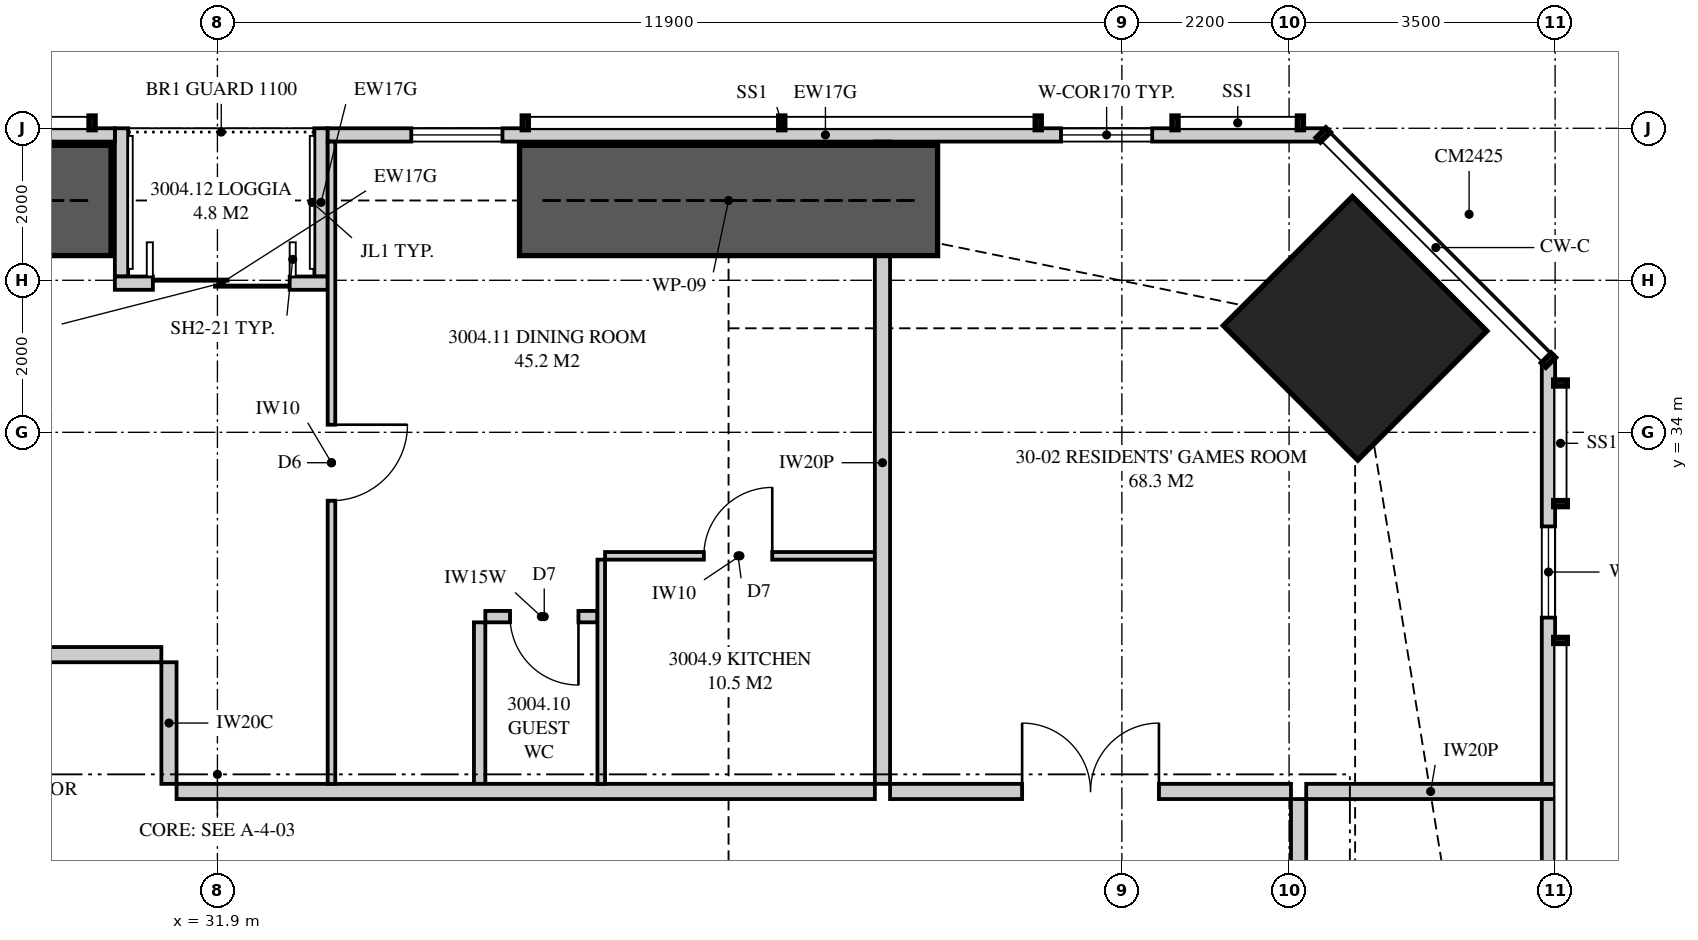
"""IFC4 building model, lengths in metres.
Left out: names, types, materials, properties, quantities, classifications, styles, units other than length and angle.
Written with IfcOpenShell. Run it as: python <this file> out.ifc"""

import sys

from ifc_helpers import new_model, si_unit, direction, frame, frame_2d, origin, origin_2d, place, context, subcontext, project, spatial, polyline, rectangle, outline, extrude, element, fill, save


model = new_model("IFC4")
c1 = context("Model", 3, precision=1e-05, world=origin(), true_north=direction((0.0, 1.0)))
c2 = subcontext(c1, "Body", "Model", "MODEL_VIEW")
j1 = project(units=[si_unit("LENGTHUNIT", "METRE"), si_unit("PLANEANGLEUNIT", "RADIAN")], contexts=[c1])
p1 = place(None, origin())
s1 = spatial("IfcSite", under=j1, at=p1, CompositionType="ELEMENT")
p2 = place(p1, origin())
s2 = spatial("IfcBuilding", under=s1, at=p2, CompositionType="ELEMENT")
p3 = place(p2, frame((0.0, 0.0, 111.55)))
s3 = spatial("IfcBuildingStorey", under=s2, at=p3, CompositionType="ELEMENT", Elevation=111.55)
p4 = place(p3, frame((46.869, 35.369, 0.0), z_axis=(0.0, 0.0, 1.0), x_axis=(-0.707106781187, -0.707106781187, 0.0)))
e1 = element("IfcColumn", 1, at=p4, inside=s3, PredefinedType="COLUMN", context=c2, shape_type="SweptSolid", body=[
    extrude(rectangle(XDim=2.4, YDim=2.5, at=origin_2d()), origin(), (0.0, 0.0, 1.0), 3.35),
])
p5 = place(p3, frame((49.413, 3.051, 0.0), z_axis=(0.0, 0.0, 1.0), x_axis=(0.0, 1.0, 0.0)))
e2 = element("IfcWall", 2, at=p5, inside=s3, PredefinedType="SOLIDWALL", context=c2, shape_type="SweptSolid", body=[
    extrude(outline(polyline([(0.0, 0.0), (31.897, 0.0), (31.897, 3.11), (22.167, 3.11), (22.167, 2.15), (22.074, 2.15), (22.074, 3.11), (21.949, 3.11), (21.949, 2.15), (9.949, 2.15), (9.949, 3.11), (9.823, 3.11), (9.823, 2.15), (9.73, 2.15), (9.73, 3.11), (0.0, 3.11), (0.0, 0.0)])), frame((0.0, 0.087, 0.0), z_axis=(0.0, -1.0, 0.0), x_axis=(1.0, 0.0, 0.0)), (0.0, 0.0, 1.0), 0.175),
])
p6 = place(p5, frame((2.118, 0.0, 0.4)))
e3 = element("IfcOpeningElement", 3, at=p6, cuts=e2, PredefinedType="OPENING", context=c2, shape_type="SweptSolid", body=[
    extrude(rectangle(XDim=1.8, YDim=1.7, at=frame_2d((0.9, 0.85))), frame((0.0, 0.097, 0.0), z_axis=(0.0, -1.0, 0.0), x_axis=(1.0, 0.0, 0.0)), (0.0, 0.0, 1.0), 0.195),
])
p7 = place(p5, frame((14.849, 0.0, 0.4)))
e4 = element("IfcOpeningElement", 4, at=p7, cuts=e2, PredefinedType="OPENING", context=c2, shape_type="SweptSolid", body=[
    extrude(rectangle(XDim=1.2, YDim=1.7, at=frame_2d((0.6, 0.85))), frame((0.0, 0.097, 0.0), z_axis=(0.0, -1.0, 0.0), x_axis=(1.0, 0.0, 0.0)), (0.0, 0.0, 1.0), 0.195),
])
p8 = place(p5, frame((28.51, 0.0, 0.4)))
e5 = element("IfcOpeningElement", 5, at=p8, cuts=e2, PredefinedType="OPENING", context=c2, shape_type="SweptSolid", body=[
    extrude(rectangle(XDim=1.2, YDim=1.7, at=frame_2d((0.6, 0.85))), frame((0.0, 0.097, 0.0), z_axis=(0.0, -1.0, 0.0), x_axis=(1.0, 0.0, 0.0)), (0.0, 0.0, 1.0), 0.195),
])
p9 = place(p3, frame((46.449, 37.913, 0.0), z_axis=(0.0, 0.0, 1.0), x_axis=(-1.0, 0.0, 0.0)))
e6 = element("IfcWall", 6, at=p9, inside=s3, PredefinedType="SOLIDWALL", context=c2, shape_type="SweptSolid", body=[
    extrude(outline(polyline([(0.0, 0.0), (13.098, 0.0), (13.098, 2.15), (7.824, 2.15), (7.824, 3.11), (7.666, 3.11), (7.666, 2.15), (7.62, 2.15), (7.62, 3.11), (0.0, 3.11), (0.0, 0.0)])), frame((0.0, 0.087, 0.0), z_axis=(0.0, -1.0, 0.0), x_axis=(1.0, 0.0, 0.0)), (0.0, 0.0, 1.0), 0.175),
])
p10 = place(p9, frame((2.25, 0.0, 0.4)))
e7 = element("IfcOpeningElement", 7, at=p10, cuts=e6, PredefinedType="OPENING", context=c2, shape_type="SweptSolid", body=[
    extrude(rectangle(XDim=1.2, YDim=1.7, at=frame_2d((0.6, 0.85))), frame((0.0, 0.097, 0.0), z_axis=(0.0, -1.0, 0.0), x_axis=(1.0, 0.0, 0.0)), (0.0, 0.0, 1.0), 0.195),
])
p11 = place(p9, frame((10.798, 0.0, 0.4)))
e8 = element("IfcOpeningElement", 8, at=p11, cuts=e6, PredefinedType="OPENING", context=c2, shape_type="SweptSolid", body=[
    extrude(rectangle(XDim=1.2, YDim=1.7, at=frame_2d((0.6, 0.85))), frame((0.0, 0.097, 0.0), z_axis=(0.0, -1.0, 0.0), x_axis=(1.0, 0.0, 0.0)), (0.0, 0.0, 1.0), 0.195),
])
p12 = place(p3, frame((30.551, 37.913, 0.0), z_axis=(0.0, 0.0, 1.0), x_axis=(-1.0, 0.0, 0.0)))
e9 = element("IfcWall", 9, at=p12, inside=s3, PredefinedType="SOLIDWALL", context=c2, shape_type="SweptSolid", body=[
    extrude(outline(polyline([(0.0, 0.0), (21.499, 0.0), (21.499, 3.11), (13.879, 3.11), (13.879, 2.15), (13.834, 2.15), (13.834, 3.11), (13.676, 3.11), (13.676, 2.15), (0.0, 2.15), (0.0, 0.0)])), frame((0.0, 0.087, 0.0), z_axis=(0.0, -1.0, 0.0), x_axis=(1.0, 0.0, 0.0)), (0.0, 0.0, 1.0), 0.175),
])
p13 = place(p12, frame((5.826, 0.0, 0.4)))
e10 = element("IfcOpeningElement", 10, at=p13, cuts=e9, PredefinedType="OPENING", context=c2, shape_type="SweptSolid", body=[
    extrude(rectangle(XDim=1.8, YDim=1.7, at=frame_2d((0.9, 0.85))), frame((0.0, 0.097, 0.0), z_axis=(0.0, -1.0, 0.0), x_axis=(1.0, 0.0, 0.0)), (0.0, 0.0, 1.0), 0.195),
])
p14 = place(p12, frame((8.993, 0.0, 0.4)))
e11 = element("IfcOpeningElement", 11, at=p14, cuts=e9, PredefinedType="OPENING", context=c2, shape_type="SweptSolid", body=[
    extrude(rectangle(XDim=1.8, YDim=1.7, at=frame_2d((0.9, 0.85))), frame((0.0, 0.097, 0.0), z_axis=(0.0, -1.0, 0.0), x_axis=(1.0, 0.0, 0.0)), (0.0, 0.0, 1.0), 0.195),
])
p15 = place(p12, frame((16.566, 0.0, 0.4)))
e12 = element("IfcOpeningElement", 12, at=p15, cuts=e9, PredefinedType="OPENING", context=c2, shape_type="SweptSolid", body=[
    extrude(rectangle(XDim=1.8, YDim=1.7, at=frame_2d((0.9, 0.85))), frame((0.0, 0.097, 0.0), z_axis=(0.0, -1.0, 0.0), x_axis=(1.0, 0.0, 0.0)), (0.0, 0.0, 1.0), 0.195),
])
p16 = place(p3, frame((33.351, 35.962, 0.0), z_axis=(0.0, 0.0, 1.0), x_axis=(-1.0, 0.0, 0.0)))
e13 = element("IfcWall", 13, at=p16, inside=s3, PredefinedType="SOLIDWALL", context=c2, shape_type="SweptSolid", body=[
    extrude(rectangle(XDim=2.8, YDim=0.175, at=frame_2d((1.4, 0.0))), origin(), (0.0, 0.0, 1.0), 3.11),
])
p17 = place(p16, frame((0.5, 0.0, 0.0)))
e14 = element("IfcOpeningElement", 14, at=p17, cuts=e13, PredefinedType="OPENING", context=c2, shape_type="SweptSolid", body=[
    extrude(rectangle(XDim=1.8, YDim=2.1, at=frame_2d((0.9, 1.05))), frame((0.0, 0.097, 0.0), z_axis=(0.0, -1.0, 0.0), x_axis=(1.0, 0.0, 0.0)), (0.0, 0.0, 1.0), 0.195),
])
for number, where, z_axis, x_axis in (
    (15, (33.263, 38.0, 0.0), (0.0, 0.0, 1.0), (0.0, -1.0, 0.0)),
    (16, (30.638, 38.0, 0.0), (0.0, 0.0, 1.0), (0.0, -1.0, 0.0)),
):
    element("IfcWall", number, at=place(p3, frame(where, z_axis=z_axis, x_axis=x_axis)), inside=s3, PredefinedType="SOLIDWALL", context=c2, shape_type="SweptSolid", body=[
        extrude(outline(polyline([(0.0, 0.0), (1.95, 0.0), (1.95, 3.11), (1.75, 3.11), (1.75, 2.15), (0.15, 2.15), (0.15, 3.11), (0.0, 3.11), (0.0, 0.0)])), frame((0.0, 0.087, 0.0), z_axis=(0.0, -1.0, 0.0), x_axis=(1.0, 0.0, 0.0)), (0.0, 0.0, 1.0), 0.175),
    ])
p18 = place(p3, frame((40.65, 37.825, 0.0), z_axis=(0.0, 0.0, 1.0), x_axis=(0.0, -1.0, 0.0)))
e17 = element("IfcWall", 17, at=p18, inside=s3, PredefinedType="PARTITIONING", context=c2, shape_type="SweptSolid", body=[
    extrude(outline(polyline([(0.259, 3.11), (0.0, 3.11), (0.0, 0.0), (0.529, 0.0), (0.529, 0.12), (1.021, 0.12), (1.021, 0.0), (8.45, 0.0), (8.45, 3.11), (3.766, 3.11), (3.766, 2.51), (2.117, 2.51), (2.117, 2.15), (1.021, 2.15), (1.021, 2.03), (0.529, 2.03), (0.529, 2.15), (0.259, 2.15), (0.259, 3.11)])), frame((0.0, 0.1, 0.0), z_axis=(0.0, -1.0, 0.0), x_axis=(1.0, 0.0, 0.0)), (0.0, 0.0, 1.0), 0.2),
])
p19 = place(p3, frame((37.0, 32.375, 0.0), z_axis=(0.0, 0.0, 1.0), x_axis=(1.0, 0.0, 0.0)))
e18 = element("IfcWall", 18, at=p19, inside=s3, PredefinedType="PARTITIONING", context=c2, shape_type="SweptSolid", body=[
    extrude(outline(polyline([(0.0, 0.0), (3.55, 0.0), (3.55, 3.11), (1.912, 3.11), (1.912, 2.541), (1.338, 2.541), (1.338, 3.11), (0.0, 3.11), (0.0, 0.0)])), frame((0.0, 0.05, 0.0), z_axis=(0.0, -1.0, 0.0), x_axis=(1.0, 0.0, 0.0)), (0.0, 0.0, 1.0), 0.1),
])
p20 = place(p19, frame((1.3, 0.0, 0.0)))
e19 = element("IfcOpeningElement", 19, at=p20, cuts=e18, PredefinedType="OPENING", context=c2, shape_type="SweptSolid", body=[
    extrude(rectangle(XDim=0.9, YDim=2.1, at=frame_2d((0.45, 1.05))), frame((0.0, 0.06, 0.0), z_axis=(0.0, -1.0, 0.0), x_axis=(1.0, 0.0, 0.0)), (0.0, 0.0, 1.0), 0.12),
])
p21 = place(p3, frame((36.95, 32.325, 0.0), z_axis=(0.0, 0.0, 1.0), x_axis=(0.0, -1.0, 0.0)))
e20 = element("IfcWall", 20, at=p21, inside=s3, PredefinedType="PARTITIONING", context=c2, shape_type="SweptSolid", body=[
    extrude(rectangle(XDim=2.95, YDim=0.1, at=frame_2d((1.475, 0.0))), origin(), (0.0, 0.0, 1.0), 3.11),
])
p22 = place(p3, frame((35.425, 31.575, 0.0), z_axis=(0.0, 0.0, 1.0), x_axis=(1.0, 0.0, 0.0)))
e21 = element("IfcWall", 21, at=p22, inside=s3, PredefinedType="PLUMBINGWALL", context=c2, shape_type="SweptSolid", body=[
    extrude(rectangle(XDim=1.475, YDim=0.15, at=frame_2d((0.737, 0.0))), origin(), (0.0, 0.0, 1.0), 3.11),
])
p23 = place(p22, frame((0.325, 0.0, 0.0)))
e22 = element("IfcOpeningElement", 22, at=p23, cuts=e21, PredefinedType="OPENING", context=c2, shape_type="SweptSolid", body=[
    extrude(rectangle(XDim=0.9, YDim=2.1, at=frame_2d((0.45, 1.05))), frame((0.0, 0.085, 0.0), z_axis=(0.0, -1.0, 0.0), x_axis=(1.0, 0.0, 0.0)), (0.0, 0.0, 1.0), 0.17),
])
p24 = place(p3, frame((35.35, 31.5, 0.0), z_axis=(0.0, 0.0, 1.0), x_axis=(0.0, -1.0, 0.0)))
e23 = element("IfcWall", 23, at=p24, inside=s3, PredefinedType="PLUMBINGWALL", context=c2, shape_type="SweptSolid", body=[
    extrude(rectangle(XDim=2.125, YDim=0.15, at=frame_2d((1.062, 0.0))), origin(), (0.0, 0.0, 1.0), 3.11),
])
p25 = place(p3, frame((33.401, 37.825, 0.0), z_axis=(0.0, 0.0, 1.0), x_axis=(0.0, -1.0, 0.0)))
e24 = element("IfcWall", 24, at=p25, inside=s3, PredefinedType="PARTITIONING", context=c2, shape_type="SweptSolid", body=[
    extrude(outline(polyline([(0.0, 0.0), (8.45, 0.0), (8.45, 3.11), (1.635, 3.11), (1.635, 2.15), (0.0, 2.15), (0.0, 3.11), (0.0, 0.0)])), frame((0.0, 0.05, 0.0), z_axis=(0.0, -1.0, 0.0), x_axis=(1.0, 0.0, 0.0)), (0.0, 0.0, 1.0), 0.1),
])
p26 = place(p25, frame((3.725, 0.0, 0.0)))
e25 = element("IfcOpeningElement", 25, at=p26, cuts=e24, PredefinedType="OPENING", context=c2, shape_type="SweptSolid", body=[
    extrude(rectangle(XDim=1.0, YDim=2.1, at=frame_2d((0.5, 1.05))), frame((0.0, 0.06, 0.0), z_axis=(0.0, -1.0, 0.0), x_axis=(1.0, 0.0, 0.0)), (0.0, 0.0, 1.0), 0.12),
])
p27 = place(p3, frame((40.75, 29.275, 0.0), z_axis=(0.0, 0.0, 1.0), x_axis=(1.0, 0.0, 0.0)))
e26 = element("IfcWall", 26, at=p27, inside=s3, PredefinedType="PARTITIONING", context=c2, shape_type="SweptSolid", body=[
    extrude(rectangle(XDim=5.275, YDim=0.2, at=frame_2d((2.637, 0.0))), origin(), (0.0, 0.0, 1.0), 3.11),
])
p28 = place(p27, frame((1.738, 0.0, 0.0)))
e27 = element("IfcOpeningElement", 27, at=p28, cuts=e26, PredefinedType="OPENING", context=c2, shape_type="SweptSolid", body=[
    extrude(rectangle(XDim=1.8, YDim=2.1, at=frame_2d((0.9, 1.05))), frame((0.0, 0.11, 0.0), z_axis=(0.0, -1.0, 0.0), x_axis=(1.0, 0.0, 0.0)), (0.0, 0.0, 1.0), 0.22),
])
p29 = place(p3, frame((46.225, 29.275, 0.0), z_axis=(0.0, 0.0, 1.0), x_axis=(1.0, 0.0, 0.0)))
e28 = element("IfcWall", 28, at=p29, inside=s3, PredefinedType="PARTITIONING", context=c2, shape_type="SweptSolid", body=[
    extrude(outline(polyline([(0.0, 0.0), (3.275, 0.0), (3.275, 3.11), (2.554, 3.11), (2.554, 2.15), (0.805, 2.15), (0.805, 2.541), (0.306, 2.541), (0.306, 3.11), (0.0, 3.11), (0.0, 0.0)])), frame((0.0, 0.1, 0.0), z_axis=(0.0, -1.0, 0.0), x_axis=(1.0, 0.0, 0.0)), (0.0, 0.0, 1.0), 0.2),
])
p30 = place(p3, frame((46.125, 7.825, 0.0), z_axis=(0.0, 0.0, 1.0), x_axis=(0.0, 1.0, 0.0)))
e29 = element("IfcWall", 29, at=p30, inside=s3, PredefinedType="PARTITIONING", context=c2, shape_type="SweptSolid", body=[
    extrude(outline(polyline([(0.0, 0.0), (21.35, 0.0), (21.35, 3.11), (17.512, 3.11), (17.512, 2.541), (16.838, 2.541), (16.838, 3.11), (5.512, 3.11), (5.512, 2.541), (4.838, 2.541), (4.838, 3.11), (0.0, 3.11), (0.0, 0.0)])), frame((0.0, 0.1, 0.0), z_axis=(0.0, -1.0, 0.0), x_axis=(1.0, 0.0, 0.0)), (0.0, 0.0, 1.0), 0.2),
])
p31 = place(p30, frame((9.775, 0.0, 0.0)))
e30 = element("IfcOpeningElement", 30, at=p31, cuts=e29, PredefinedType="OPENING", context=c2, shape_type="SweptSolid", body=[
    extrude(rectangle(XDim=1.8, YDim=2.1, at=frame_2d((0.9, 1.05))), frame((0.0, 0.11, 0.0), z_axis=(0.0, -1.0, 0.0), x_axis=(1.0, 0.0, 0.0)), (0.0, 0.0, 1.0), 0.22),
])
p32 = place(p30, frame((19.5, 0.0, 0.0)))
e31 = element("IfcOpeningElement", 31, at=p32, cuts=e29, PredefinedType="OPENING", context=c2, shape_type="SweptSolid", body=[
    extrude(rectangle(XDim=1.0, YDim=2.1, at=frame_2d((0.5, 1.05))), frame((0.0, 0.11, 0.0), z_axis=(0.0, -1.0, 0.0), x_axis=(1.0, 0.0, 0.0)), (0.0, 0.0, 1.0), 0.22),
])
p33 = place(p3, frame((31.363, 29.275, 0.0), z_axis=(0.0, 0.0, 1.0), x_axis=(1.0, 0.0, 0.0)))
e32 = element("IfcWall", 32, at=p33, inside=s3, PredefinedType="PARTITIONING", context=c2, shape_type="SweptSolid", body=[
    extrude(outline(polyline([(0.0, 0.0), (9.188, 0.0), (9.188, 3.11), (7.6, 3.11), (7.6, 2.541), (6.925, 2.541), (6.925, 3.11), (0.0, 3.11), (0.0, 0.0)])), frame((0.0, 0.1, 0.0), z_axis=(0.0, -1.0, 0.0), x_axis=(1.0, 0.0, 0.0)), (0.0, 0.0, 1.0), 0.2),
])
p34 = place(p3, frame((27.163, 31.075, 0.0), z_axis=(0.0, 0.0, 1.0), x_axis=(1.0, 0.0, 0.0)))
e33 = element("IfcWall", 33, at=p34, inside=s3, PredefinedType="PARTITIONING", context=c2, shape_type="SweptSolid", body=[
    extrude(outline(polyline([(0.0, 0.0), (4.0, 0.0), (4.0, 3.11), (0.925, 3.11), (0.925, 2.541), (0.25, 2.541), (0.25, 3.11), (0.0, 3.11), (0.0, 0.0)])), frame((0.0, 0.1, 0.0), z_axis=(0.0, -1.0, 0.0), x_axis=(1.0, 0.0, 0.0)), (0.0, 0.0, 1.0), 0.2),
])
p35 = place(p3, frame((31.262, 29.375, 0.0), z_axis=(0.0, 0.0, 1.0), x_axis=(0.0, 1.0, 0.0)))
e34 = element("IfcWall", 34, at=p35, inside=s3, PredefinedType="PARTITIONING", context=c2, shape_type="SweptSolid", body=[
    extrude(rectangle(XDim=1.6, YDim=0.2, at=frame_2d((0.8, 0.0))), origin(), (0.0, 0.0, 1.0), 3.11),
])
for number, where, z_axis, x_axis in (
    (35, (35.875, 37.05, 0.0), (0.0, 0.0, 1.0), (1.0, 0.0, 0.0)),
    (36, (25.0, 37.05, 0.0), (0.0, 0.0, 1.0), (1.0, 0.0, 0.0)),
):
    element("IfcWall", number, at=place(p3, frame(where, z_axis=z_axis, x_axis=x_axis)), inside=s3, PredefinedType="SHEAR", context=c2, shape_type="SweptSolid", body=[
        extrude(rectangle(XDim=5.5, YDim=1.45, at=frame_2d((2.75, 0.0))), origin(), (0.0, 0.0, 1.0), 3.35),
    ])
p36 = place(p8, origin())
e37 = element("IfcWindow", 37, at=p36, inside=s3, PartitioningType="SINGLE_PANEL", PredefinedType="WINDOW", context=c2, shape_type="SweptSolid", body=[
    extrude(rectangle(XDim=1.2, YDim=1.7, at=frame_2d((0.6, 0.85))), frame((0.0, 0.03, 0.0), z_axis=(0.0, -1.0, 0.0), x_axis=(1.0, 0.0, 0.0)), (0.0, 0.0, 1.0), 0.06),
])
fill(e5, e37)
p37 = place(p10, origin())
e38 = element("IfcWindow", 38, at=p37, inside=s3, PartitioningType="SINGLE_PANEL", PredefinedType="WINDOW", context=c2, shape_type="SweptSolid", body=[
    extrude(rectangle(XDim=1.2, YDim=1.7, at=frame_2d((0.6, 0.85))), frame((0.0, 0.03, 0.0), z_axis=(0.0, -1.0, 0.0), x_axis=(1.0, 0.0, 0.0)), (0.0, 0.0, 1.0), 0.06),
])
fill(e7, e38)
p38 = place(p11, origin())
e39 = element("IfcWindow", 39, at=p38, inside=s3, PartitioningType="SINGLE_PANEL", PredefinedType="WINDOW", context=c2, shape_type="SweptSolid", body=[
    extrude(rectangle(XDim=1.2, YDim=1.7, at=frame_2d((0.6, 0.85))), frame((0.0, 0.03, 0.0), z_axis=(0.0, -1.0, 0.0), x_axis=(1.0, 0.0, 0.0)), (0.0, 0.0, 1.0), 0.06),
])
fill(e8, e39)
p39 = place(p17, origin())
e40 = element("IfcDoor", 40, at=p39, inside=s3, OperationType="SLIDING_TO_LEFT", PredefinedType="DOOR", context=c2, shape_type="SweptSolid", body=[
    extrude(rectangle(XDim=1.8, YDim=2.1, at=frame_2d((0.9, 1.05))), frame((0.0, 0.025, 0.0), z_axis=(0.0, -1.0, 0.0), x_axis=(1.0, 0.0, 0.0)), (0.0, 0.0, 1.0), 0.05),
])
fill(e14, e40)
p40 = place(p20, origin())
e41 = element("IfcDoor", 41, at=p40, inside=s3, OperationType="SINGLE_SWING_RIGHT", PredefinedType="DOOR", context=c2, shape_type="SweptSolid", body=[
    extrude(rectangle(XDim=0.9, YDim=2.1, at=frame_2d((0.45, 1.05))), frame((0.0, 0.025, 0.0), z_axis=(0.0, -1.0, 0.0), x_axis=(1.0, 0.0, 0.0)), (0.0, 0.0, 1.0), 0.05),
])
fill(e19, e41)
p41 = place(p23, frame((0.9, 0.0, 0.0), z_axis=(0.0, 0.0, 1.0), x_axis=(-1.0, 0.0, 0.0)))
e42 = element("IfcDoor", 42, at=p41, inside=s3, OperationType="SINGLE_SWING_LEFT", PredefinedType="DOOR", context=c2, shape_type="SweptSolid", body=[
    extrude(rectangle(XDim=0.9, YDim=2.1, at=frame_2d((0.45, 1.05))), frame((0.0, 0.025, 0.0), z_axis=(0.0, -1.0, 0.0), x_axis=(1.0, 0.0, 0.0)), (0.0, 0.0, 1.0), 0.05),
])
fill(e22, e42)
p42 = place(p26, origin())
e43 = element("IfcDoor", 43, at=p42, inside=s3, OperationType="SINGLE_SWING_LEFT", PredefinedType="DOOR", context=c2, shape_type="SweptSolid", body=[
    extrude(rectangle(XDim=1.0, YDim=2.1, at=frame_2d((0.5, 1.05))), frame((0.0, 0.025, 0.0), z_axis=(0.0, -1.0, 0.0), x_axis=(1.0, 0.0, 0.0)), (0.0, 0.0, 1.0), 0.05),
])
fill(e25, e43)
p43 = place(p28, origin())
e44 = element("IfcDoor", 44, at=p43, inside=s3, OperationType="DOUBLE_DOOR_SINGLE_SWING", PredefinedType="DOOR", context=c2, shape_type="SweptSolid", body=[
    extrude(rectangle(XDim=1.8, YDim=2.1, at=frame_2d((0.9, 1.05))), frame((0.0, 0.025, 0.0), z_axis=(0.0, -1.0, 0.0), x_axis=(1.0, 0.0, 0.0)), (0.0, 0.0, 1.0), 0.05),
])
fill(e27, e44)
save(model, sys.argv[1])
